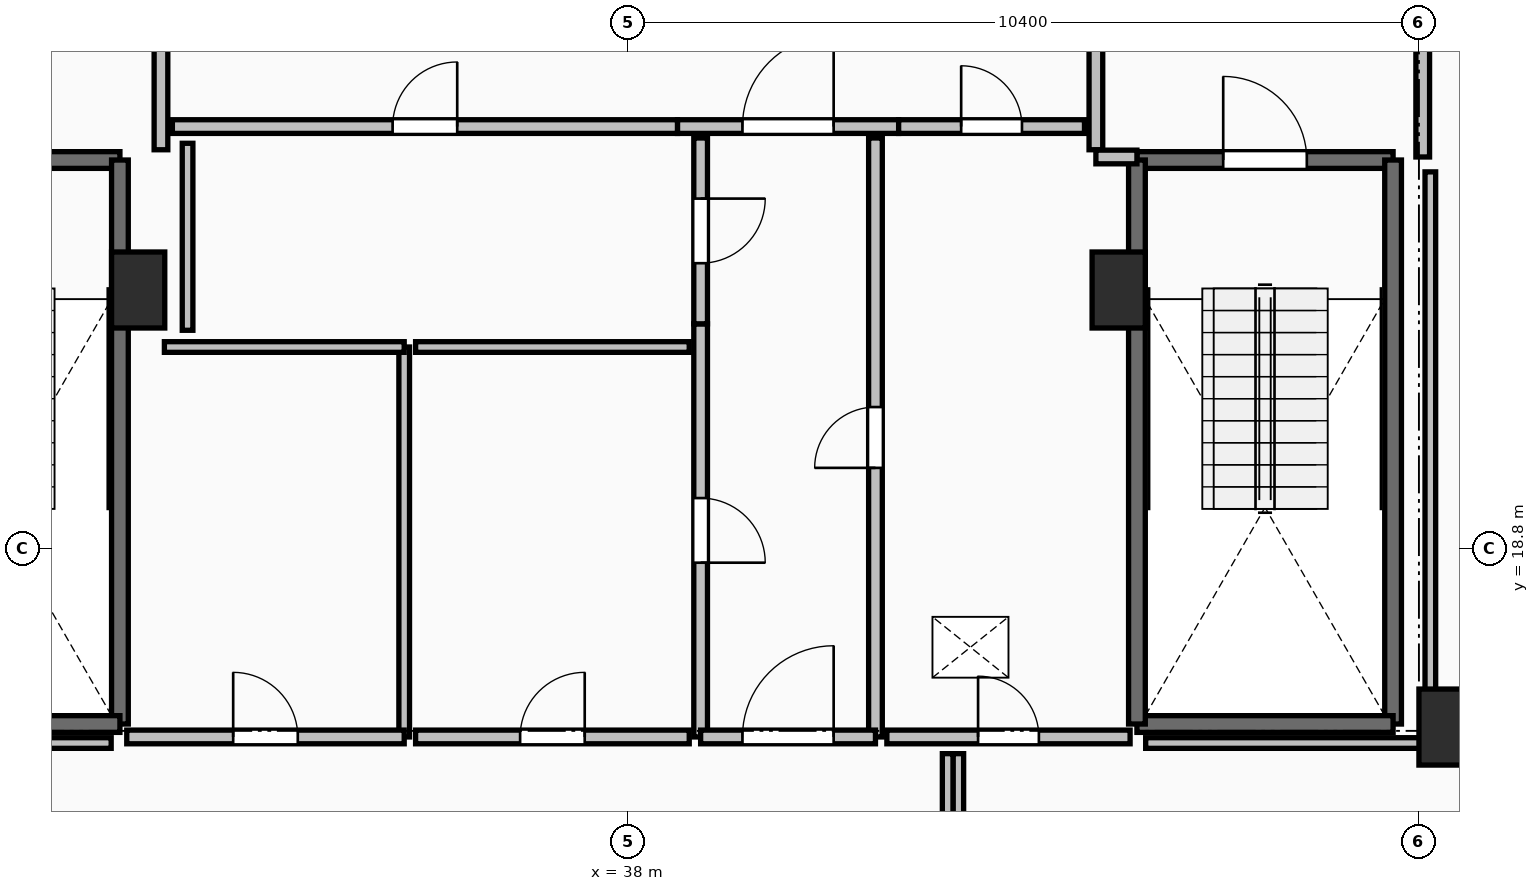
"""IFC4 building model, lengths in metres.
Left out: names, types, materials, properties, quantities, classifications, styles, units other than length and angle.
Written with IfcOpenShell. Run it as: python <this file> out.ifc"""

import sys

from ifc_helpers import new_model, si_unit, direction, frame, frame_2d, origin, origin_2d, place, context, subcontext, project, spatial, rectangle, extrude, element, fill, save


model = new_model("IFC4")
c1 = context("Model", 3, precision=1e-05, world=origin(), true_north=direction((0.0, 1.0)))
c2 = subcontext(c1, "Body", "Model", "MODEL_VIEW")
j1 = project(units=[si_unit("LENGTHUNIT", "METRE"), si_unit("PLANEANGLEUNIT", "RADIAN")], contexts=[c1])
p1 = place(None, origin())
s1 = spatial("IfcSite", under=j1, at=p1, CompositionType="ELEMENT")
p2 = place(p1, origin())
s2 = spatial("IfcBuilding", under=s1, at=p2, CompositionType="ELEMENT")
p3 = place(p2, frame((0.0, 0.0, 259.1)))
s3 = spatial("IfcBuildingStorey", under=s2, at=p3, CompositionType="ELEMENT", Elevation=259.1)
for number, where, z_axis, x_axis in (
    (1, (31.55, 22.2, 0.0), (0.0, 0.0, 1.0), (1.0, 0.0, 0.0)),
    (2, (48.75, 16.45, 0.0), (0.0, 0.0, 1.0), (1.0, 0.0, 0.0)),
    (3, (44.45, 22.2, 0.0), (0.0, 0.0, 1.0), (1.0, 0.0, 0.0)),
):
    element("IfcColumn", number, at=place(p3, frame(where, z_axis=z_axis, x_axis=x_axis)), inside=s3, PredefinedType="PILASTER", context=c2, shape_type="SweptSolid", body=[
        extrude(rectangle(XDim=0.7, YDim=1.0, at=origin_2d()), origin(), (0.0, 0.0, 1.0), 3.55),
    ])
p4 = place(p3, frame((27.94, 23.91, 0.0), z_axis=(0.0, 0.0, 1.0), x_axis=(1.0, 0.0, 0.0)))
e4 = element("IfcWall", 4, at=p4, inside=s3, PredefinedType="SOLIDWALL", context=c2, shape_type="SweptSolid", body=[
    extrude(rectangle(XDim=3.37, YDim=0.22, at=frame_2d((1.685, 0.0))), origin(), (0.0, 0.0, 1.0), 3.29),
])
p5 = place(p4, frame((1.135, 0.0, 0.0)))
e5 = element("IfcOpeningElement", 5, at=p5, cuts=e4, PredefinedType="OPENING", context=c2, shape_type="SweptSolid", body=[
    extrude(rectangle(XDim=1.1, YDim=2.15, at=frame_2d((0.55, 1.075))), frame((0.0, 0.125, 0.0), z_axis=(0.0, -1.0, 0.0), x_axis=(1.0, 0.0, 0.0)), (0.0, 0.0, 1.0), 0.25),
])
p6 = place(p3, frame((31.31, 23.91, 0.0), z_axis=(0.0, 0.0, 1.0), x_axis=(0.0, -1.0, 0.0)))
e6 = element("IfcWall", 6, at=p6, inside=s3, PredefinedType="SOLIDWALL", context=c2, shape_type="SweptSolid", body=[
    extrude(rectangle(XDim=7.42, YDim=0.22, at=frame_2d((3.71, 0.0))), origin(), (0.0, 0.0, 1.0), 3.29),
])
p7 = place(p3, frame((31.31, 16.49, 0.0), z_axis=(0.0, 0.0, 1.0), x_axis=(-1.0, 0.0, 0.0)))
e7 = element("IfcWall", 7, at=p7, inside=s3, PredefinedType="SOLIDWALL", context=c2, shape_type="SweptSolid", body=[
    extrude(rectangle(XDim=3.37, YDim=0.22, at=frame_2d((1.685, 0.0))), origin(), (0.0, 0.0, 1.0), 3.29),
])
p8 = place(p3, frame((44.69, 23.91, 0.0), z_axis=(0.0, 0.0, 1.0), x_axis=(1.0, 0.0, 0.0)))
e8 = element("IfcWall", 8, at=p8, inside=s3, PredefinedType="SOLIDWALL", context=c2, shape_type="SweptSolid", body=[
    extrude(rectangle(XDim=3.37, YDim=0.22, at=frame_2d((1.685, 0.0))), origin(), (0.0, 0.0, 1.0), 3.29),
])
p9 = place(p8, frame((1.135, 0.0, 0.0)))
e9 = element("IfcOpeningElement", 9, at=p9, cuts=e8, PredefinedType="OPENING", context=c2, shape_type="SweptSolid", body=[
    extrude(rectangle(XDim=1.1, YDim=2.15, at=frame_2d((0.55, 1.075))), frame((0.0, 0.125, 0.0), z_axis=(0.0, -1.0, 0.0), x_axis=(1.0, 0.0, 0.0)), (0.0, 0.0, 1.0), 0.25),
])
p10 = place(p3, frame((48.06, 23.91, 0.0), z_axis=(0.0, 0.0, 1.0), x_axis=(0.0, -1.0, 0.0)))
e10 = element("IfcWall", 10, at=p10, inside=s3, PredefinedType="SOLIDWALL", context=c2, shape_type="SweptSolid", body=[
    extrude(rectangle(XDim=7.42, YDim=0.22, at=frame_2d((3.71, 0.0))), origin(), (0.0, 0.0, 1.0), 3.29),
])
p11 = place(p3, frame((48.06, 16.49, 0.0), z_axis=(0.0, 0.0, 1.0), x_axis=(-1.0, 0.0, 0.0)))
e11 = element("IfcWall", 11, at=p11, inside=s3, PredefinedType="SOLIDWALL", context=c2, shape_type="SweptSolid", body=[
    extrude(rectangle(XDim=3.37, YDim=0.22, at=frame_2d((1.685, 0.0))), origin(), (0.0, 0.0, 1.0), 3.29),
])
p12 = place(p3, frame((44.69, 16.49, 0.0), z_axis=(0.0, 0.0, 1.0), x_axis=(0.0, 1.0, 0.0)))
e12 = element("IfcWall", 12, at=p12, inside=s3, PredefinedType="SOLIDWALL", context=c2, shape_type="SweptSolid", body=[
    extrude(rectangle(XDim=7.42, YDim=0.22, at=frame_2d((3.71, 0.0))), origin(), (0.0, 0.0, 1.0), 3.29),
])
p13 = place(p3, frame((31.85, 24.045, 0.0), z_axis=(0.0, 0.0, 1.0), x_axis=(0.0, 1.0, 0.0)))
e13 = element("IfcWall", 13, at=p13, inside=s3, PredefinedType="PARTITIONING", context=c2, shape_type="SweptSolid", body=[
    extrude(rectangle(XDim=3.91, YDim=0.18, at=frame_2d((1.955, 0.0))), origin(), (0.0, 0.0, 1.0), 3.29),
])
p14 = place(p13, frame((1.355, 0.0, 0.0)))
e14 = element("IfcOpeningElement", 14, at=p14, cuts=e13, PredefinedType="OPENING", context=c2, shape_type="SweptSolid", body=[
    extrude(rectangle(XDim=1.2, YDim=2.15, at=frame_2d((0.6, 1.075))), frame((0.0, 0.105, 0.0), z_axis=(0.0, -1.0, 0.0), x_axis=(1.0, 0.0, 0.0)), (0.0, 0.0, 1.0), 0.21),
])
p15 = place(p3, frame((44.15, 27.955, 0.0), z_axis=(0.0, 0.0, 1.0), x_axis=(0.0, -1.0, 0.0)))
e15 = element("IfcWall", 15, at=p15, inside=s3, PredefinedType="PARTITIONING", context=c2, shape_type="SweptSolid", body=[
    extrude(rectangle(XDim=3.91, YDim=0.18, at=frame_2d((1.955, 0.0))), origin(), (0.0, 0.0, 1.0), 3.29),
])
p16 = place(p15, frame((1.355, 0.0, 0.0)))
e16 = element("IfcOpeningElement", 16, at=p16, cuts=e15, PredefinedType="OPENING", context=c2, shape_type="SweptSolid", body=[
    extrude(rectangle(XDim=1.2, YDim=2.15, at=frame_2d((0.6, 1.075))), frame((0.0, 0.105, 0.0), z_axis=(0.0, -1.0, 0.0), x_axis=(1.0, 0.0, 0.0)), (0.0, 0.0, 1.0), 0.21),
])
p17 = place(p3, frame((44.15, 23.95, 0.0), z_axis=(0.0, 0.0, 1.0), x_axis=(1.0, 0.0, 0.0)))
e17 = element("IfcWall", 17, at=p17, inside=s3, PredefinedType="PARTITIONING", context=c2, shape_type="SweptSolid", body=[
    extrude(rectangle(XDim=0.54, YDim=0.18, at=frame_2d((0.27, 0.0))), origin(), (0.0, 0.0, 1.0), 3.29),
])
p18 = place(p3, frame((48.45, 23.95, 0.0), z_axis=(0.0, 0.0, 1.0), x_axis=(0.0, 1.0, 0.0)))
e18 = element("IfcWall", 18, at=p18, inside=s3, PredefinedType="PARTITIONING", context=c2, shape_type="SweptSolid", body=[
    extrude(rectangle(XDim=4.05, YDim=0.18, at=frame_2d((2.025, 0.0))), origin(), (0.0, 0.0, 1.0), 3.29),
])
p19 = place(p18, frame((1.425, 0.0, 0.0)))
e19 = element("IfcOpeningElement", 19, at=p19, cuts=e18, PredefinedType="OPENING", context=c2, shape_type="SweptSolid", body=[
    extrude(rectangle(XDim=1.2, YDim=2.15, at=frame_2d((0.6, 1.075))), frame((0.0, 0.105, 0.0), z_axis=(0.0, -1.0, 0.0), x_axis=(1.0, 0.0, 0.0)), (0.0, 0.0, 1.0), 0.21),
])
p20 = place(p3, frame((38.645, 24.35, 0.0), z_axis=(0.0, 0.0, 1.0), x_axis=(1.0, 0.0, 0.0)))
e20 = element("IfcWall", 20, at=p20, inside=s3, PredefinedType="PARTITIONING", context=c2, shape_type="SweptSolid", body=[
    extrude(rectangle(XDim=2.91, YDim=0.18, at=frame_2d((1.455, 0.0))), origin(), (0.0, 0.0, 1.0), 3.29),
])
p21 = place(p20, frame((0.855, 0.0, 0.0)))
e21 = element("IfcOpeningElement", 21, at=p21, cuts=e20, PredefinedType="OPENING", context=c2, shape_type="SweptSolid", body=[
    extrude(rectangle(XDim=1.2, YDim=2.15, at=frame_2d((0.6, 1.075))), frame((0.0, 0.105, 0.0), z_axis=(0.0, -1.0, 0.0), x_axis=(1.0, 0.0, 0.0)), (0.0, 0.0, 1.0), 0.21),
])
p22 = place(p3, frame((41.555, 24.35, 0.0), z_axis=(0.0, 0.0, 1.0), x_axis=(1.0, 0.0, 0.0)))
e22 = element("IfcWall", 22, at=p22, inside=s3, PredefinedType="PARTITIONING", context=c2, shape_type="SweptSolid", body=[
    extrude(rectangle(XDim=2.445, YDim=0.18, at=frame_2d((1.223, 0.0))), origin(), (0.0, 0.0, 1.0), 3.29),
])
p23 = place(p22, frame((0.823, 0.0, 0.0)))
e23 = element("IfcOpeningElement", 23, at=p23, cuts=e22, PredefinedType="OPENING", context=c2, shape_type="SweptSolid", body=[
    extrude(rectangle(XDim=0.8, YDim=2.05, at=frame_2d((0.4, 1.025))), frame((0.0, 0.105, 0.0), z_axis=(0.0, -1.0, 0.0), x_axis=(1.0, 0.0, 0.0)), (0.0, 0.0, 1.0), 0.21),
])
p24 = place(p3, frame((32.0, 24.35, 0.0), z_axis=(0.0, 0.0, 1.0), x_axis=(1.0, 0.0, 0.0)))
e24 = element("IfcWall", 24, at=p24, inside=s3, PredefinedType="PARTITIONING", context=c2, shape_type="SweptSolid", body=[
    extrude(rectangle(XDim=6.645, YDim=0.18, at=frame_2d((3.323, 0.0))), origin(), (0.0, 0.0, 1.0), 3.29),
])
p25 = place(p24, frame((2.897, 0.0, 0.0)))
e25 = element("IfcOpeningElement", 25, at=p25, cuts=e24, PredefinedType="OPENING", context=c2, shape_type="SweptSolid", body=[
    extrude(rectangle(XDim=0.85, YDim=2.1, at=frame_2d((0.425, 1.05))), frame((0.0, 0.105, 0.0), z_axis=(0.0, -1.0, 0.0), x_axis=(1.0, 0.0, 0.0)), (0.0, 0.0, 1.0), 0.21),
])
p26 = place(p3, frame((41.25, 16.32, 0.0), z_axis=(0.0, 0.0, 1.0), x_axis=(0.0, 1.0, 0.0)))
e26 = element("IfcWall", 26, at=p26, inside=s3, PredefinedType="PARTITIONING", context=c2, shape_type="SweptSolid", body=[
    extrude(rectangle(XDim=7.88, YDim=0.18, at=frame_2d((3.94, 0.0))), origin(), (0.0, 0.0, 1.0), 2.482),
])
p27 = place(p26, frame((3.54, 0.0, 0.0)))
e27 = element("IfcOpeningElement", 27, at=p27, cuts=e26, PredefinedType="OPENING", context=c2, shape_type="SweptSolid", body=[
    extrude(rectangle(XDim=0.8, YDim=2.05, at=frame_2d((0.4, 1.025))), frame((0.0, 0.105, 0.0), z_axis=(0.0, -1.0, 0.0), x_axis=(1.0, 0.0, 0.0)), (0.0, 0.0, 1.0), 0.21),
])
p28 = place(p3, frame((38.95, 21.755, 0.0), z_axis=(0.0, 0.0, 1.0), x_axis=(0.0, -1.0, 0.0)))
e28 = element("IfcWall", 28, at=p28, inside=s3, PredefinedType="PARTITIONING", context=c2, shape_type="SweptSolid", body=[
    extrude(rectangle(XDim=5.435, YDim=0.18, at=frame_2d((2.717, 0.0))), origin(), (0.0, 0.0, 1.0), 3.29),
])
p29 = place(p28, frame((2.292, 0.0, 0.0)))
e29 = element("IfcOpeningElement", 29, at=p29, cuts=e28, PredefinedType="OPENING", context=c2, shape_type="SweptSolid", body=[
    extrude(rectangle(XDim=0.85, YDim=2.1, at=frame_2d((0.425, 1.05))), frame((0.0, 0.105, 0.0), z_axis=(0.0, -1.0, 0.0), x_axis=(1.0, 0.0, 0.0)), (0.0, 0.0, 1.0), 0.21),
])
p30 = place(p3, frame((38.95, 24.2, 0.0), z_axis=(0.0, 0.0, 1.0), x_axis=(0.0, -1.0, 0.0)))
e30 = element("IfcWall", 30, at=p30, inside=s3, PredefinedType="PARTITIONING", context=c2, shape_type="SweptSolid", body=[
    extrude(rectangle(XDim=2.445, YDim=0.18, at=frame_2d((1.223, 0.0))), origin(), (0.0, 0.0, 1.0), 2.482),
])
p31 = place(p30, frame((0.798, 0.0, 0.0)))
e31 = element("IfcOpeningElement", 31, at=p31, cuts=e30, PredefinedType="OPENING", context=c2, shape_type="SweptSolid", body=[
    extrude(rectangle(XDim=0.85, YDim=2.1, at=frame_2d((0.425, 1.05))), frame((0.0, 0.105, 0.0), z_axis=(0.0, -1.0, 0.0), x_axis=(1.0, 0.0, 0.0)), (0.0, 0.0, 1.0), 0.21),
])
p32 = place(p3, frame((38.95, 16.32, 0.0), z_axis=(0.0, 0.0, 1.0), x_axis=(1.0, 0.0, 0.0)))
e32 = element("IfcWall", 32, at=p32, inside=s3, PredefinedType="PARTITIONING", context=c2, shape_type="SweptSolid", body=[
    extrude(rectangle(XDim=2.3, YDim=0.18, at=frame_2d((1.15, 0.0))), origin(), (0.0, 0.0, 1.0), 3.29),
])
p33 = place(p32, frame((0.55, 0.0, 0.0)))
e33 = element("IfcOpeningElement", 33, at=p33, cuts=e32, PredefinedType="OPENING", context=c2, shape_type="SweptSolid", body=[
    extrude(rectangle(XDim=1.2, YDim=2.15, at=frame_2d((0.6, 1.075))), frame((0.0, 0.105, 0.0), z_axis=(0.0, -1.0, 0.0), x_axis=(1.0, 0.0, 0.0)), (0.0, 0.0, 1.0), 0.21),
])
p34 = place(p3, frame((41.4, 16.32, 0.0), z_axis=(0.0, 0.0, 1.0), x_axis=(1.0, 0.0, 0.0)))
e34 = element("IfcWall", 34, at=p34, inside=s3, PredefinedType="PARTITIONING", context=c2, shape_type="SweptSolid", body=[
    extrude(rectangle(XDim=3.2, YDim=0.18, at=frame_2d((1.6, 0.0))), origin(), (0.0, 0.0, 1.0), 3.29),
])
p35 = place(p34, frame((1.2, 0.0, 0.0)))
e35 = element("IfcOpeningElement", 35, at=p35, cuts=e34, PredefinedType="OPENING", context=c2, shape_type="SweptSolid", body=[
    extrude(rectangle(XDim=0.8, YDim=2.05, at=frame_2d((0.4, 1.025))), frame((0.0, 0.105, 0.0), z_axis=(0.0, -1.0, 0.0), x_axis=(1.0, 0.0, 0.0)), (0.0, 0.0, 1.0), 0.21),
])
p36 = place(p3, frame((35.05, 16.32, 0.0), z_axis=(0.0, 0.0, 1.0), x_axis=(0.0, 1.0, 0.0)))
e36 = element("IfcWall", 36, at=p36, inside=s3, PredefinedType="PARTITIONING", context=c2, shape_type="SweptSolid", body=[
    extrude(rectangle(XDim=5.13, YDim=0.14, at=frame_2d((2.565, 0.0))), origin(), (0.0, 0.0, 1.0), 3.29),
])
p37 = place(p3, frame((35.05, 21.45, 0.0), z_axis=(0.0, 0.0, 1.0), x_axis=(-1.0, 0.0, 0.0)))
e37 = element("IfcWall", 37, at=p37, inside=s3, PredefinedType="PARTITIONING", context=c2, shape_type="SweptSolid", body=[
    extrude(rectangle(XDim=3.155, YDim=0.14, at=frame_2d((1.578, 0.0))), origin(), (0.0, 0.0, 1.0), 3.29),
])
p38 = place(p3, frame((31.4, 16.32, 0.0), z_axis=(0.0, 0.0, 1.0), x_axis=(1.0, 0.0, 0.0)))
e38 = element("IfcWall", 38, at=p38, inside=s3, PredefinedType="PARTITIONING", context=c2, shape_type="SweptSolid", body=[
    extrude(rectangle(XDim=3.65, YDim=0.18, at=frame_2d((1.825, 0.0))), origin(), (0.0, 0.0, 1.0), 3.29),
])
p39 = place(p38, frame((1.4, 0.0, 0.0)))
e39 = element("IfcOpeningElement", 39, at=p39, cuts=e38, PredefinedType="OPENING", context=c2, shape_type="SweptSolid", body=[
    extrude(rectangle(XDim=0.85, YDim=2.1, at=frame_2d((0.425, 1.05))), frame((0.0, 0.105, 0.0), z_axis=(0.0, -1.0, 0.0), x_axis=(1.0, 0.0, 0.0)), (0.0, 0.0, 1.0), 0.21),
])
p40 = place(p3, frame((38.8, 21.45, 0.0), z_axis=(0.0, 0.0, 1.0), x_axis=(-1.0, 0.0, 0.0)))
e40 = element("IfcWall", 40, at=p40, inside=s3, PredefinedType="PARTITIONING", context=c2, shape_type="SweptSolid", body=[
    extrude(rectangle(XDim=3.6, YDim=0.14, at=frame_2d((1.8, 0.0))), origin(), (0.0, 0.0, 1.0), 3.29),
])
p41 = place(p3, frame((35.2, 16.32, 0.0), z_axis=(0.0, 0.0, 1.0), x_axis=(1.0, 0.0, 0.0)))
e41 = element("IfcWall", 41, at=p41, inside=s3, PredefinedType="PARTITIONING", context=c2, shape_type="SweptSolid", body=[
    extrude(rectangle(XDim=3.6, YDim=0.18, at=frame_2d((1.8, 0.0))), origin(), (0.0, 0.0, 1.0), 3.29),
])
p42 = place(p41, frame((1.375, 0.0, 0.0)))
e42 = element("IfcOpeningElement", 42, at=p42, cuts=e41, PredefinedType="OPENING", context=c2, shape_type="SweptSolid", body=[
    extrude(rectangle(XDim=0.85, YDim=2.1, at=frame_2d((0.425, 1.05))), frame((0.0, 0.105, 0.0), z_axis=(0.0, -1.0, 0.0), x_axis=(1.0, 0.0, 0.0)), (0.0, 0.0, 1.0), 0.21),
])
p43 = place(p3, frame((32.2, 24.13, 0.0), z_axis=(0.0, 0.0, 1.0), x_axis=(0.0, -1.0, 0.0)))
e43 = element("IfcWall", 43, at=p43, inside=s3, PredefinedType="PARTITIONING", context=c2, shape_type="SweptSolid", body=[
    extrude(rectangle(XDim=2.46, YDim=0.14, at=frame_2d((1.23, 0.0))), origin(), (0.0, 0.0, 1.0), 2.482),
])
p44 = place(p3, frame((42.34, 14.25, 0.0), z_axis=(0.0, 0.0, 1.0), x_axis=(0.0, 1.0, 0.0)))
e44 = element("IfcWall", 44, at=p44, inside=s3, PredefinedType="PARTITIONING", context=c2, shape_type="SweptSolid", body=[
    extrude(rectangle(XDim=1.85, YDim=0.14, at=frame_2d((0.925, 0.0))), origin(), (0.0, 0.0, 1.0), 3.29),
])
p45 = place(p3, frame((44.805, 16.24, 0.0), z_axis=(0.0, 0.0, 1.0), x_axis=(1.0, 0.0, 0.0)))
e45 = element("IfcWall", 45, at=p45, inside=s3, PredefinedType="PARTITIONING", context=c2, shape_type="SweptSolid", body=[
    extrude(rectangle(XDim=3.745, YDim=0.14, at=frame_2d((1.873, 0.0))), origin(), (0.0, 0.0, 1.0), 2.482),
])
p46 = place(p3, frame((48.55, 16.24, 0.0), z_axis=(0.0, 0.0, 1.0), x_axis=(0.0, 1.0, 0.0)))
e46 = element("IfcWall", 46, at=p46, inside=s3, PredefinedType="PARTITIONING", context=c2, shape_type="SweptSolid", body=[
    extrude(rectangle(XDim=7.514, YDim=0.14, at=frame_2d((3.757, 0.0))), origin(), (0.0, 0.0, 1.0), 2.482),
])
p47 = place(p3, frame((27.45, 16.24, 0.0), z_axis=(0.0, 0.0, 1.0), x_axis=(1.0, 0.0, 0.0)))
e47 = element("IfcWall", 47, at=p47, inside=s3, PredefinedType="PARTITIONING", context=c2, shape_type="SweptSolid", body=[
    extrude(rectangle(XDim=3.745, YDim=0.14, at=frame_2d((1.873, 0.0))), origin(), (0.0, 0.0, 1.0), 2.482),
])
p48 = place(p3, frame((42.2, 16.1, 0.0), z_axis=(0.0, 0.0, 1.0), x_axis=(0.0, -1.0, 0.0)))
e48 = element("IfcWall", 48, at=p48, inside=s3, PredefinedType="PARTITIONING", context=c2, shape_type="SweptSolid", body=[
    extrude(rectangle(XDim=1.85, YDim=0.14, at=frame_2d((0.925, 0.0))), origin(), (0.0, 0.0, 1.0), 3.29),
])
p49 = place(p9, origin())
e49 = element("IfcDoor", 49, at=p49, inside=s3, OperationType="SINGLE_SWING_LEFT", PredefinedType="DOOR", context=c2, shape_type="SweptSolid", body=[
    extrude(rectangle(XDim=1.1, YDim=2.15, at=frame_2d((0.55, 1.075))), frame((0.0, 0.025, 0.0), z_axis=(0.0, -1.0, 0.0), x_axis=(1.0, 0.0, 0.0)), (0.0, 0.0, 1.0), 0.05),
])
fill(e9, e49)
p50 = place(p21, origin())
e50 = element("IfcDoor", 50, at=p50, inside=s3, OperationType="SINGLE_SWING_RIGHT", PredefinedType="DOOR", context=c2, shape_type="SweptSolid", body=[
    extrude(rectangle(XDim=1.2, YDim=2.15, at=frame_2d((0.6, 1.075))), frame((0.0, 0.025, 0.0), z_axis=(0.0, -1.0, 0.0), x_axis=(1.0, 0.0, 0.0)), (0.0, 0.0, 1.0), 0.05),
])
fill(e21, e50)
p51 = place(p23, origin())
e51 = element("IfcDoor", 51, at=p51, inside=s3, OperationType="SINGLE_SWING_LEFT", PredefinedType="DOOR", context=c2, shape_type="SweptSolid", body=[
    extrude(rectangle(XDim=0.8, YDim=2.05, at=frame_2d((0.4, 1.025))), frame((0.0, 0.025, 0.0), z_axis=(0.0, -1.0, 0.0), x_axis=(1.0, 0.0, 0.0)), (0.0, 0.0, 1.0), 0.05),
])
fill(e23, e51)
p52 = place(p25, origin())
e52 = element("IfcDoor", 52, at=p52, inside=s3, OperationType="SINGLE_SWING_RIGHT", PredefinedType="DOOR", context=c2, shape_type="SweptSolid", body=[
    extrude(rectangle(XDim=0.85, YDim=2.1, at=frame_2d((0.425, 1.05))), frame((0.0, 0.025, 0.0), z_axis=(0.0, -1.0, 0.0), x_axis=(1.0, 0.0, 0.0)), (0.0, 0.0, 1.0), 0.05),
])
fill(e25, e52)
p53 = place(p27, origin())
e53 = element("IfcDoor", 53, at=p53, inside=s3, OperationType="SINGLE_SWING_LEFT", PredefinedType="DOOR", context=c2, shape_type="SweptSolid", body=[
    extrude(rectangle(XDim=0.8, YDim=2.05, at=frame_2d((0.4, 1.025))), frame((0.0, 0.025, 0.0), z_axis=(0.0, -1.0, 0.0), x_axis=(1.0, 0.0, 0.0)), (0.0, 0.0, 1.0), 0.05),
])
fill(e27, e53)
p54 = place(p29, origin())
e54 = element("IfcDoor", 54, at=p54, inside=s3, OperationType="SINGLE_SWING_RIGHT", PredefinedType="DOOR", context=c2, shape_type="SweptSolid", body=[
    extrude(rectangle(XDim=0.85, YDim=2.1, at=frame_2d((0.425, 1.05))), frame((0.0, 0.025, 0.0), z_axis=(0.0, -1.0, 0.0), x_axis=(1.0, 0.0, 0.0)), (0.0, 0.0, 1.0), 0.05),
])
fill(e29, e54)
p55 = place(p31, origin())
e55 = element("IfcDoor", 55, at=p55, inside=s3, OperationType="SINGLE_SWING_LEFT", PredefinedType="DOOR", context=c2, shape_type="SweptSolid", body=[
    extrude(rectangle(XDim=0.85, YDim=2.1, at=frame_2d((0.425, 1.05))), frame((0.0, 0.025, 0.0), z_axis=(0.0, -1.0, 0.0), x_axis=(1.0, 0.0, 0.0)), (0.0, 0.0, 1.0), 0.05),
])
fill(e31, e55)
p56 = place(p33, origin())
e56 = element("IfcDoor", 56, at=p56, inside=s3, OperationType="SINGLE_SWING_RIGHT", PredefinedType="DOOR", context=c2, shape_type="SweptSolid", body=[
    extrude(rectangle(XDim=1.2, YDim=2.15, at=frame_2d((0.6, 1.075))), frame((0.0, 0.025, 0.0), z_axis=(0.0, -1.0, 0.0), x_axis=(1.0, 0.0, 0.0)), (0.0, 0.0, 1.0), 0.05),
])
fill(e33, e56)
p57 = place(p35, origin())
e57 = element("IfcDoor", 57, at=p57, inside=s3, OperationType="SINGLE_SWING_LEFT", PredefinedType="DOOR", context=c2, shape_type="SweptSolid", body=[
    extrude(rectangle(XDim=0.8, YDim=2.05, at=frame_2d((0.4, 1.025))), frame((0.0, 0.025, 0.0), z_axis=(0.0, -1.0, 0.0), x_axis=(1.0, 0.0, 0.0)), (0.0, 0.0, 1.0), 0.05),
])
fill(e35, e57)
p58 = place(p39, origin())
e58 = element("IfcDoor", 58, at=p58, inside=s3, OperationType="SINGLE_SWING_LEFT", PredefinedType="DOOR", context=c2, shape_type="SweptSolid", body=[
    extrude(rectangle(XDim=0.85, YDim=2.1, at=frame_2d((0.425, 1.05))), frame((0.0, 0.025, 0.0), z_axis=(0.0, -1.0, 0.0), x_axis=(1.0, 0.0, 0.0)), (0.0, 0.0, 1.0), 0.05),
])
fill(e39, e58)
p59 = place(p42, origin())
e59 = element("IfcDoor", 59, at=p59, inside=s3, OperationType="SINGLE_SWING_RIGHT", PredefinedType="DOOR", context=c2, shape_type="SweptSolid", body=[
    extrude(rectangle(XDim=0.85, YDim=2.1, at=frame_2d((0.425, 1.05))), frame((0.0, 0.025, 0.0), z_axis=(0.0, -1.0, 0.0), x_axis=(1.0, 0.0, 0.0)), (0.0, 0.0, 1.0), 0.05),
])
fill(e42, e59)
save(model, sys.argv[1])
